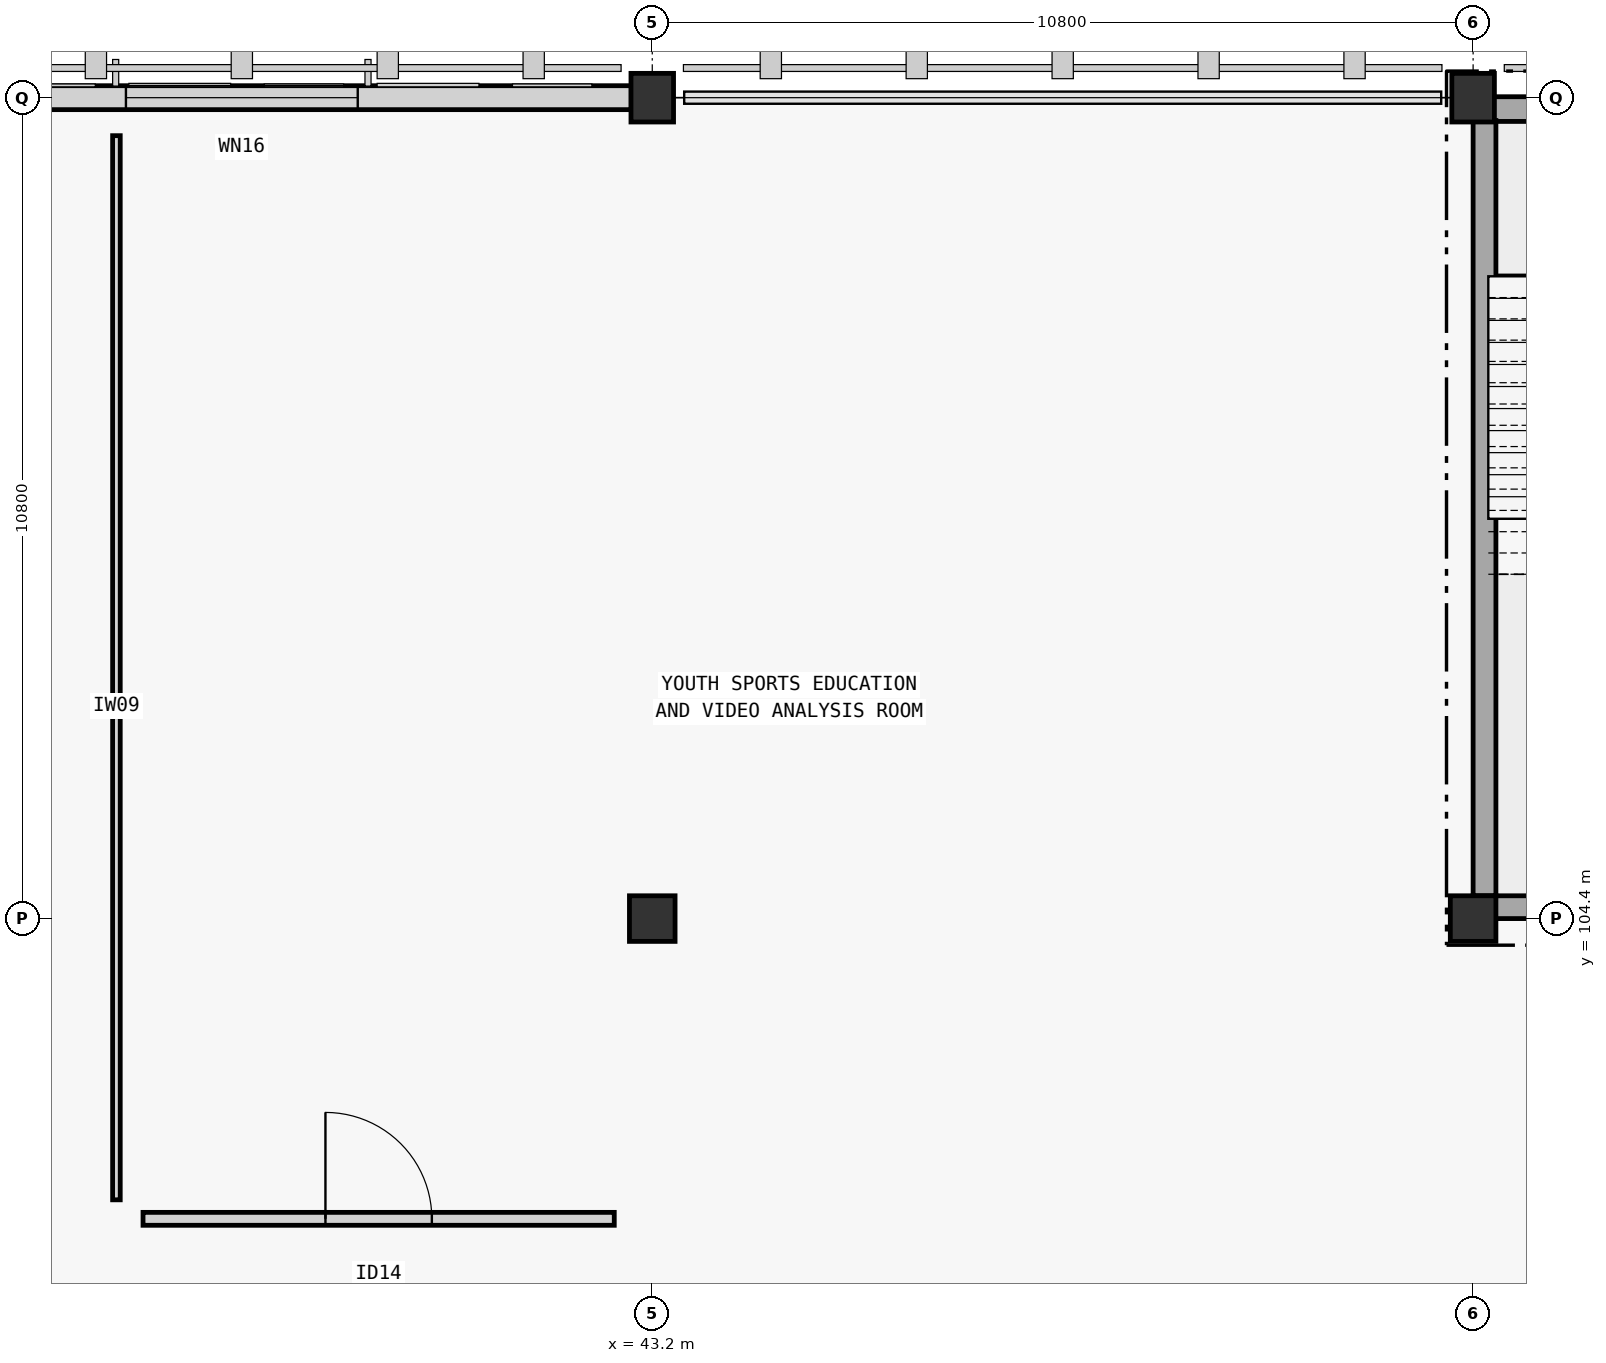
"""IFC4 building model, lengths in metres.
Left out: names, types, materials, properties, quantities, classifications, styles, units other than length and angle.
Written with IfcOpenShell. Run it as: python <this file> out.ifc"""

import sys

from ifc_helpers import new_model, si_unit, direction, frame, frame_2d, origin, origin_2d, place, context, subcontext, project, spatial, rectangle, extrude, element, fill, save


model = new_model("IFC4")
c1 = context("Model", 3, precision=1e-05, world=origin(), true_north=direction((0.0, 1.0)))
c2 = subcontext(c1, "Body", "Model", "MODEL_VIEW")
j1 = project(units=[si_unit("LENGTHUNIT", "METRE"), si_unit("PLANEANGLEUNIT", "RADIAN")], contexts=[c1])
p1 = place(None, origin())
s1 = spatial("IfcSite", under=j1, at=p1, CompositionType="ELEMENT")
p2 = place(p1, origin())
s2 = spatial("IfcBuilding", under=s1, at=p2, CompositionType="ELEMENT")
p3 = place(p2, frame((0.0, 0.0, 10.8)))
s3 = spatial("IfcBuildingStorey", under=s2, at=p3, CompositionType="ELEMENT", Elevation=10.8)
p4 = place(p3, frame((43.2, 104.4, 0.0), z_axis=(0.0, 0.0, 1.0), x_axis=(1.0, 0.0, 0.0)))
e1 = element("IfcColumn", 1, at=p4, inside=s3, PredefinedType="COLUMN", context=c2, shape_type="SweptSolid", body=[
    extrude(rectangle(XDim=0.6, YDim=0.6, at=origin_2d()), origin(), (0.0, 0.0, 1.0), 4.2),
])
p5 = place(p3, frame((43.2, 115.2, 0.0), z_axis=(0.0, 0.0, 1.0), x_axis=(1.0, 0.0, 0.0)))
e2 = element("IfcColumn", 2, at=p5, inside=s3, PredefinedType="COLUMN", context=c2, shape_type="SweptSolid", body=[
    extrude(rectangle(XDim=0.56, YDim=0.64, at=origin_2d()), origin(), (0.0, 0.0, 1.0), 4.2),
])
p6 = place(p3, frame((54.0, 104.4, 0.0), z_axis=(0.0, 0.0, 1.0), x_axis=(1.0, 0.0, 0.0)))
e3 = element("IfcColumn", 3, at=p6, inside=s3, PredefinedType="COLUMN", context=c2, shape_type="SweptSolid", body=[
    extrude(rectangle(XDim=0.6, YDim=0.6, at=origin_2d()), origin(), (0.0, 0.0, 1.0), 4.2),
])
p7 = place(p3, frame((54.0, 115.2, 0.0), z_axis=(0.0, 0.0, 1.0), x_axis=(1.0, 0.0, 0.0)))
e4 = element("IfcColumn", 4, at=p7, inside=s3, PredefinedType="COLUMN", context=c2, shape_type="SweptSolid", body=[
    extrude(rectangle(XDim=0.56, YDim=0.64, at=origin_2d()), origin(), (0.0, 0.0, 1.0), 4.2),
])
p8 = place(p3, frame((64.8, 104.55, 0.0), z_axis=(0.0, 0.0, 1.0), x_axis=(-1.0, 0.0, 0.0)))
e5 = element("IfcWall", 5, at=p8, inside=s3, PredefinedType="SHEAR", context=c2, shape_type="SweptSolid", body=[
    extrude(rectangle(XDim=10.8, YDim=0.3, at=frame_2d((5.4, 0.0))), origin(), (0.0, 0.0, 1.0), 4.2),
])
p9 = place(p3, frame((54.0, 115.05, 0.0), z_axis=(0.0, 0.0, 1.0), x_axis=(1.0, 0.0, 0.0)))
e6 = element("IfcWall", 6, at=p9, inside=s3, PredefinedType="SHEAR", context=c2, shape_type="SweptSolid", body=[
    extrude(rectangle(XDim=10.8, YDim=0.325, at=frame_2d((5.4, 0.0))), origin(), (0.0, 0.0, 1.0), 4.2),
])
p10 = place(p3, frame((54.15, 104.7, 0.0), z_axis=(0.0, 0.0, 1.0), x_axis=(0.0, 1.0, 0.0)))
e7 = element("IfcWall", 7, at=p10, inside=s3, PredefinedType="SHEAR", context=c2, shape_type="SweptSolid", body=[
    extrude(rectangle(XDim=10.2, YDim=0.3, at=frame_2d((5.1, 0.0))), origin(), (0.0, 0.0, 1.0), 4.2),
])
p11 = place(p3, frame((32.676, 115.2, 0.0), z_axis=(0.0, 0.0, 1.0), x_axis=(1.0, 0.0, 0.0)))
e8 = element("IfcWall", 8, at=p11, inside=s3, PredefinedType="STANDARD", context=c2, shape_type="SweptSolid", body=[
    extrude(rectangle(XDim=10.248, YDim=0.315, at=frame_2d((5.124, 0.0))), origin(), (0.0, 0.0, 1.0), 3.245),
])
p12 = place(p11, frame((3.599, 0.0, 0.9)))
e9 = element("IfcOpeningElement", 9, at=p12, cuts=e8, PredefinedType="OPENING", context=c2, shape_type="SweptSolid", body=[
    extrude(rectangle(XDim=3.05, YDim=1.62, at=frame_2d((1.525, 0.81))), frame((0.0, 0.157, 0.0), z_axis=(0.0, -1.0, 0.0), x_axis=(1.0, 0.0, 0.0)), (0.0, 0.0, 1.0), 0.315),
])
p13 = place(p3, frame((36.5, 100.45, 0.0), z_axis=(0.0, 0.0, 1.0), x_axis=(1.0, 0.0, 0.0)))
e10 = element("IfcWall", 10, at=p13, inside=s3, PredefinedType="STANDARD", context=c2, shape_type="SweptSolid", body=[
    extrude(rectangle(XDim=6.2, YDim=0.17, at=frame_2d((3.1, 0.0))), origin(), (0.0, 0.0, 1.0), 3.04),
])
p14 = place(p13, frame((2.4, 0.0, 0.0)))
e11 = element("IfcOpeningElement", 11, at=p14, cuts=e10, PredefinedType="OPENING", context=c2, shape_type="SweptSolid", body=[
    extrude(rectangle(XDim=1.4, YDim=2.22, at=frame_2d((0.7, 1.11))), frame((0.0, 0.085, 0.0), z_axis=(0.0, -1.0, 0.0), x_axis=(1.0, 0.0, 0.0)), (0.0, 0.0, 1.0), 0.17),
])
p15 = place(p3, frame((36.15, 100.7, 0.0), z_axis=(0.0, 0.0, 1.0), x_axis=(0.0, 1.0, 0.0)))
e12 = element("IfcWall", 12, at=p15, inside=s3, PredefinedType="STANDARD", context=c2, shape_type="SweptSolid", body=[
    extrude(rectangle(XDim=14.0, YDim=0.1, at=frame_2d((7.0, 0.0))), origin(), (0.0, 0.0, 1.0), 3.04),
])
p16 = place(p12, origin())
e13 = element("IfcWindow", 13, at=p16, inside=s3, PartitioningType="SINGLE_PANEL", PredefinedType="WINDOW", context=c2, shape_type="SweptSolid", body=[
    extrude(rectangle(XDim=3.05, YDim=1.62, at=frame_2d((1.525, 0.81))), frame((0.0, 0.03, 0.0), z_axis=(0.0, -1.0, 0.0), x_axis=(1.0, 0.0, 0.0)), (0.0, 0.0, 1.0), 0.06),
])
fill(e9, e13)
p17 = place(p14, origin())
e14 = element("IfcDoor", 14, at=p17, inside=s3, OperationType="SINGLE_SWING_LEFT", PredefinedType="DOOR", context=c2, shape_type="SweptSolid", body=[
    extrude(rectangle(XDim=1.4, YDim=2.22, at=frame_2d((0.7, 1.11))), frame((0.0, 0.025, 0.0), z_axis=(0.0, -1.0, 0.0), x_axis=(1.0, 0.0, 0.0)), (0.0, 0.0, 1.0), 0.05),
])
fill(e11, e14)
save(model, sys.argv[1])
